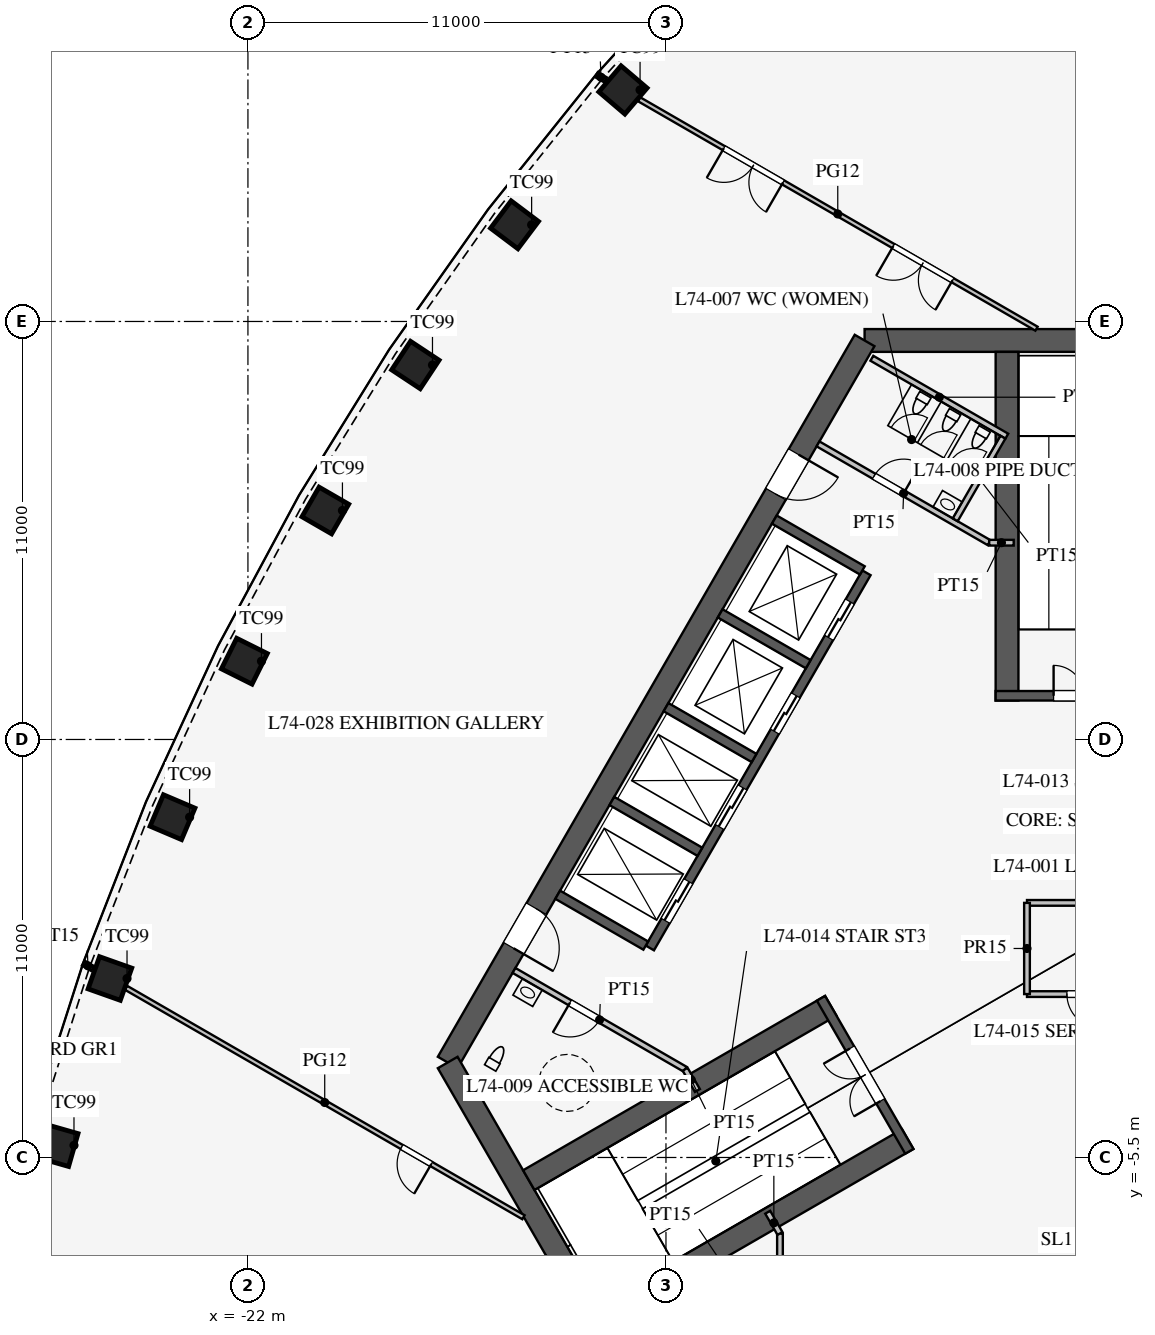
"""IFC4 building model, lengths in metres.
Left out: names, types, materials, properties, quantities, classifications, styles, units other than length and angle.
Written with IfcOpenShell. Run it as: python <this file> out.ifc"""

import sys

from ifc_helpers import new_model, si_unit, direction, frame, frame_2d, origin, origin_2d, place, context, subcontext, project, spatial, rectangle, extrude, element, fill, save


model = new_model("IFC4")
c1 = context("Model", 3, precision=1e-05, world=origin(), true_north=direction((0.0, 1.0)))
c2 = subcontext(c1, "Body", "Model", "MODEL_VIEW")
j1 = project(units=[si_unit("LENGTHUNIT", "METRE"), si_unit("PLANEANGLEUNIT", "RADIAN")], contexts=[c1])
p1 = place(None, origin())
s1 = spatial("IfcSite", under=j1, at=p1, CompositionType="ELEMENT")
p2 = place(p1, origin())
s2 = spatial("IfcBuilding", under=s1, at=p2, CompositionType="ELEMENT")
p3 = place(p2, frame((0.0, 0.0, 322.5)))
s3 = spatial("IfcBuildingStorey", under=s2, at=p3, CompositionType="ELEMENT", Elevation=322.5)
for number, where, z_axis, x_axis in (
    (1, (-12.132, 22.593, 0.0), (0.0, 0.0, 1.0), (-0.649, -0.761, 0.0)),
    (2, (-14.985, 19.044, 0.0), (0.0, 0.0, 1.0), (-0.601, -0.799, 0.0)),
    (3, (-17.594, 15.354, 0.0), (0.0, 0.0, 1.0), (-0.552, -0.834, 0.0)),
    (4, (-19.963, 11.526, 0.0), (0.0, 0.0, 1.0), (-0.5, -0.866, 0.0)),
    (5, (-22.094, 7.56, 0.0), (0.0, 0.0, 1.0), (-0.447, -0.895, 0.0)),
    (6, (-23.985, 3.455, 0.0), (0.0, 0.0, 1.0), (-0.391, -0.92, 0.0)),
    (7, (-25.632, -0.79, 0.0), (0.0, 0.0, 1.0), (-0.334, -0.942, 0.0)),
    (8, (-27.027, -5.18, 0.0), (0.0, 0.0, 1.0), (-0.275, -0.961, 0.0)),
):
    element("IfcColumn", number, at=place(p3, frame(where, z_axis=z_axis, x_axis=x_axis)), inside=s3, PredefinedType="COLUMN", context=c2, shape_type="SweptSolid", body=[
        extrude(rectangle(XDim=0.9, YDim=0.9, at=origin_2d()), origin(), (0.0, 0.0, 1.0), 6.0),
    ])
p4 = place(p3, frame((5.773, 16.0, 0.0), z_axis=(0.0, 0.0, 1.0), x_axis=(-1.0, 0.0, 0.0)))
e9 = element("IfcWall", 9, at=p4, inside=s3, PredefinedType="SHEAR", context=c2, shape_type="SweptSolid", body=[
    extrude(rectangle(XDim=11.547, YDim=0.6, at=frame_2d((5.773, 0.0))), origin(), (0.0, 0.0, 1.0), 6.0),
])
p5 = place(p3, frame((-5.773, 16.0, 0.0), z_axis=(0.0, 0.0, 1.0), x_axis=(-0.500002442456, -0.866023993627, 0.0)))
e10 = element("IfcWall", 10, at=p5, inside=s3, PredefinedType="SHEAR", context=c2, shape_type="SweptSolid", body=[
    extrude(rectangle(XDim=21.939, YDim=0.6, at=frame_2d((10.97, 0.0))), origin(), (0.0, 0.0, 1.0), 6.0),
])
p6 = place(p5, frame((17.27, 0.0, 0.0)))
e11 = element("IfcOpeningElement", 11, at=p6, cuts=e10, PredefinedType="OPENING", context=c2, shape_type="SweptSolid", body=[
    extrude(rectangle(XDim=1.2, YDim=2.1, at=frame_2d((0.6, 1.05))), frame((0.0, 0.31, 0.0), z_axis=(0.0, -1.0, 0.0), x_axis=(1.0, 0.0, 0.0)), (0.0, 0.0, 1.0), 0.62),
])
p7 = place(p5, frame((3.47, 0.0, 0.0)))
e12 = element("IfcOpeningElement", 12, at=p7, cuts=e10, PredefinedType="OPENING", context=c2, shape_type="SweptSolid", body=[
    extrude(rectangle(XDim=1.2, YDim=2.1, at=frame_2d((0.6, 1.05))), frame((0.0, 0.31, 0.0), z_axis=(0.0, -1.0, 0.0), x_axis=(1.0, 0.0, 0.0)), (0.0, 0.0, 1.0), 0.62),
])
p8 = place(p3, frame((-16.743, -3.0, 0.0), z_axis=(0.0, 0.0, 1.0), x_axis=(0.499995765644, -0.866027848477, 0.0)))
e13 = element("IfcWall", 13, at=p8, inside=s3, PredefinedType="SHEAR", context=c2, shape_type="SweptSolid", body=[
    extrude(rectangle(XDim=11.547, YDim=0.6, at=frame_2d((5.773, 0.0))), origin(), (0.0, 0.0, 1.0), 6.0),
])
p9 = place(p3, frame((-5.724, 9.886, 0.0), z_axis=(0.0, 0.0, 1.0), x_axis=(-0.500001763848, -0.866024385424, 0.0)))
e14 = element("IfcWall", 14, at=p9, inside=s3, PredefinedType="SHEAR", context=c2, shape_type="SweptSolid", body=[
    extrude(rectangle(XDim=11.4, YDim=0.25, at=frame_2d((5.7, 0.0))), origin(), (0.0, 0.0, 1.0), 6.0),
])
p10 = place(p9, frame((0.875, 0.0, 0.0)))
e15 = element("IfcOpeningElement", 15, at=p10, cuts=e14, PredefinedType="OPENING", context=c2, shape_type="SweptSolid", body=[
    extrude(rectangle(XDim=1.1, YDim=2.2, at=frame_2d((0.55, 1.1))), frame((0.0, 0.135, 0.0), z_axis=(0.0, -1.0, 0.0), x_axis=(1.0, 0.0, 0.0)), (0.0, 0.0, 1.0), 0.27),
])
p11 = place(p9, frame((3.725, 0.0, 0.0)))
e16 = element("IfcOpeningElement", 16, at=p11, cuts=e14, PredefinedType="OPENING", context=c2, shape_type="SweptSolid", body=[
    extrude(rectangle(XDim=1.1, YDim=2.2, at=frame_2d((0.55, 1.1))), frame((0.0, 0.135, 0.0), z_axis=(0.0, -1.0, 0.0), x_axis=(1.0, 0.0, 0.0)), (0.0, 0.0, 1.0), 0.27),
])
p12 = place(p9, frame((6.525, 0.0, 0.0)))
e17 = element("IfcOpeningElement", 17, at=p12, cuts=e14, PredefinedType="OPENING", context=c2, shape_type="SweptSolid", body=[
    extrude(rectangle(XDim=1.2, YDim=2.2, at=frame_2d((0.6, 1.1))), frame((0.0, 0.135, 0.0), z_axis=(0.0, -1.0, 0.0), x_axis=(1.0, 0.0, 0.0)), (0.0, 0.0, 1.0), 0.27),
])
p13 = place(p9, frame((9.375, 0.0, 0.0)))
e18 = element("IfcOpeningElement", 18, at=p13, cuts=e14, PredefinedType="OPENING", context=c2, shape_type="SweptSolid", body=[
    extrude(rectangle(XDim=1.2, YDim=2.2, at=frame_2d((0.6, 1.1))), frame((0.0, 0.135, 0.0), z_axis=(0.0, -1.0, 0.0), x_axis=(1.0, 0.0, 0.0)), (0.0, 0.0, 1.0), 0.27),
])
for number, where, z_axis, x_axis in (
    (19, (-5.832, 9.949, 0.0), (0.0, 0.0, 1.0), (-0.866, 0.5, 0.0)),
    (20, (-7.257, 7.481, 0.0), (0.0, 0.0, 1.0), (-0.866, 0.5, 0.0)),
    (21, (-8.682, 5.012, 0.0), (0.0, 0.0, 1.0), (-0.866, 0.5, 0.0)),
    (22, (-10.107, 2.544, 0.0), (0.0, 0.0, 1.0), (-0.866, 0.5, 0.0)),
    (23, (-11.532, 0.076, 0.0), (0.0, 0.0, 1.0), (-0.866, 0.5, 0.0)),
):
    element("IfcWall", number, at=place(p3, frame(where, z_axis=z_axis, x_axis=x_axis)), inside=s3, PredefinedType="SHEAR", context=c2, shape_type="SweptSolid", body=[
        extrude(rectangle(XDim=2.675, YDim=0.25, at=frame_2d((1.337, 0.0))), origin(), (0.0, 0.0, 1.0), 6.0),
    ])
p14 = place(p3, frame((-2.025, 6.525, 0.0), z_axis=(0.0, 0.0, 1.0), x_axis=(0.0, 1.0, 0.0)))
e24 = element("IfcWall", 24, at=p14, inside=s3, PredefinedType="SHEAR", context=c2, shape_type="SweptSolid", body=[
    extrude(rectangle(XDim=9.175, YDim=0.6, at=frame_2d((4.587, 0.0))), origin(), (0.0, 0.0, 1.0), 6.0),
])
p15 = place(p3, frame((2.325, 6.65, 0.0), z_axis=(0.0, 0.0, 1.0), x_axis=(-1.0, 0.0, 0.0)))
e25 = element("IfcWall", 25, at=p15, inside=s3, PredefinedType="SHEAR", context=c2, shape_type="SweptSolid", body=[
    extrude(rectangle(XDim=4.65, YDim=0.25, at=frame_2d((2.325, 0.0))), origin(), (0.0, 0.0, 1.0), 6.0),
])
p16 = place(p15, frame((1.525, 0.0, 0.0)))
e26 = element("IfcOpeningElement", 26, at=p16, cuts=e25, PredefinedType="OPENING", context=c2, shape_type="SweptSolid", body=[
    extrude(rectangle(XDim=1.6, YDim=2.1, at=frame_2d((0.8, 1.05))), frame((0.0, 0.135, 0.0), z_axis=(0.0, -1.0, 0.0), x_axis=(1.0, 0.0, 0.0)), (0.0, 0.0, 1.0), 0.27),
])
p17 = place(p3, frame((-6.663, -1.509, 0.0), z_axis=(0.0, 0.0, 1.0), x_axis=(-0.86603049496, -0.499991181721, 0.0)))
e27 = element("IfcWall", 27, at=p17, inside=s3, PredefinedType="SHEAR", context=c2, shape_type="SweptSolid", body=[
    extrude(rectangle(XDim=9.175, YDim=0.6, at=frame_2d((4.587, 0.0))), origin(), (0.0, 0.0, 1.0), 6.0),
])
p18 = place(p3, frame((-4.638, -5.016, 0.0), z_axis=(0.0, 0.0, 1.0), x_axis=(-0.866012320003, -0.50002266109, 0.0)))
e28 = element("IfcWall", 28, at=p18, inside=s3, PredefinedType="SHEAR", context=c2, shape_type="SweptSolid", body=[
    extrude(rectangle(XDim=9.175, YDim=0.6, at=frame_2d((4.587, 0.0))), origin(), (0.0, 0.0, 1.0), 6.0),
])
p19 = place(p3, frame((-6.922, -1.312, 0.0), z_axis=(0.0, 0.0, 1.0), x_axis=(0.499984536904, -0.866034331223, 0.0)))
e29 = element("IfcWall", 29, at=p19, inside=s3, PredefinedType="SHEAR", context=c2, shape_type="SweptSolid", body=[
    extrude(rectangle(XDim=4.65, YDim=0.25, at=frame_2d((2.325, 0.0))), origin(), (0.0, 0.0, 1.0), 6.0),
])
p20 = place(p19, frame((1.525, 0.0, 0.0)))
e30 = element("IfcOpeningElement", 30, at=p20, cuts=e29, PredefinedType="OPENING", context=c2, shape_type="SweptSolid", body=[
    extrude(rectangle(XDim=1.6, YDim=2.1, at=frame_2d((0.8, 1.05))), frame((0.0, 0.135, 0.0), z_axis=(0.0, -1.0, 0.0), x_axis=(1.0, 0.0, 0.0)), (0.0, 0.0, 1.0), 0.27),
])
p21 = place(p3, frame((-8.0, -7.5, 0.0), z_axis=(0.0, 0.0, 1.0), x_axis=(0.0, -1.0, 0.0)))
e31 = element("IfcWall", 31, at=p21, inside=s3, PredefinedType="PARTITIONING", context=c2, shape_type="SweptSolid", body=[
    extrude(rectangle(XDim=5.2, YDim=0.15, at=frame_2d((2.6, 0.0))), origin(), (0.0, 0.0, 1.0), 5.75),
])
p22 = place(p21, frame((2.6, 0.0, 0.0)))
e32 = element("IfcOpeningElement", 32, at=p22, cuts=e31, PredefinedType="OPENING", context=c2, shape_type="SweptSolid", body=[
    extrude(rectangle(XDim=0.9, YDim=2.1, at=frame_2d((0.45, 1.05))), frame((0.0, 0.085, 0.0), z_axis=(0.0, -1.0, 0.0), x_axis=(1.0, 0.0, 0.0)), (0.0, 0.0, 1.0), 0.17),
])
p23 = place(p3, frame((-10.495, -3.178, 0.0), z_axis=(0.0, 0.0, 1.0), x_axis=(-0.866021400173, 0.500006934395, 0.0)))
e33 = element("IfcWall", 33, at=p23, inside=s3, PredefinedType="PARTITIONING", context=c2, shape_type="SweptSolid", body=[
    extrude(rectangle(XDim=5.2, YDim=0.15, at=frame_2d((2.6, 0.0))), origin(), (0.0, 0.0, 1.0), 5.75),
])
p24 = place(p23, frame((2.6, 0.0, 0.0)))
e34 = element("IfcOpeningElement", 34, at=p24, cuts=e33, PredefinedType="OPENING", context=c2, shape_type="SweptSolid", body=[
    extrude(rectangle(XDim=0.9, YDim=2.1, at=frame_2d((0.45, 1.05))), frame((0.0, 0.085, 0.0), z_axis=(0.0, -1.0, 0.0), x_axis=(1.0, 0.0, 0.0)), (0.0, 0.0, 1.0), 0.17),
])
p25 = place(p3, frame((-2.495, 10.678, 0.0), z_axis=(0.0, 0.0, 1.0), x_axis=(-0.866021400173, 0.500006934395, 0.0)))
e35 = element("IfcWall", 35, at=p25, inside=s3, PredefinedType="PARTITIONING", context=c2, shape_type="SweptSolid", body=[
    extrude(rectangle(XDim=5.2, YDim=0.15, at=frame_2d((2.6, 0.0))), origin(), (0.0, 0.0, 1.0), 5.75),
])
p26 = place(p25, frame((2.6, 0.0, 0.0)))
e36 = element("IfcOpeningElement", 36, at=p26, cuts=e35, PredefinedType="OPENING", context=c2, shape_type="SweptSolid", body=[
    extrude(rectangle(XDim=0.9, YDim=2.1, at=frame_2d((0.45, 1.05))), frame((0.0, 0.085, 0.0), z_axis=(0.0, -1.0, 0.0), x_axis=(1.0, 0.0, 0.0)), (0.0, 0.0, 1.0), 0.17),
])
p27 = place(p3, frame((-2.495, 10.678, 0.0), z_axis=(0.0, 0.0, 1.0), x_axis=(1.0, 0.0, 0.0)))
e37 = element("IfcWall", 37, at=p27, inside=s3, PredefinedType="PARTITIONING", context=c2, shape_type="SweptSolid", body=[
    extrude(rectangle(XDim=0.645, YDim=0.15, at=frame_2d((0.323, 0.0))), origin(), (0.0, 0.0, 1.0), 5.75),
])
for number, where, z_axis, x_axis in (
    (38, (-10.495, -3.178, 0.0), (0.0, 0.0, 1.0), (0.5, -0.866, 0.0)),
    (39, (-8.0, -7.5, 0.0), (0.0, 0.0, 1.0), (-0.5, 0.866, 0.0)),
):
    element("IfcWall", number, at=place(p3, frame(where, z_axis=z_axis, x_axis=x_axis)), inside=s3, PredefinedType="PARTITIONING", context=c2, shape_type="SweptSolid", body=[
        extrude(rectangle(XDim=0.645, YDim=0.15, at=frame_2d((0.323, 0.0))), origin(), (0.0, 0.0, 1.0), 5.75),
    ])
p28 = place(p3, frame((-2.031, 13.482, 0.0), z_axis=(0.0, 0.0, 1.0), x_axis=(-0.866050731258, 0.499956128963, 0.0)))
e40 = element("IfcWall", 40, at=p28, inside=s3, PredefinedType="PARTITIONING", context=c2, shape_type="SweptSolid", body=[
    extrude(rectangle(XDim=4.1, YDim=0.15, at=frame_2d((2.05, 0.0))), origin(), (0.0, 0.0, 1.0), 5.75),
])
p29 = place(p3, frame((-3.389, 11.281, 0.0), z_axis=(0.0, 0.0, 1.0), x_axis=(0.499989096993, 0.866031698547, 0.0)))
e41 = element("IfcWall", 41, at=p29, inside=s3, PredefinedType="PARTITIONING", context=c2, shape_type="SweptSolid", body=[
    extrude(rectangle(XDim=2.51, YDim=0.15, at=frame_2d((1.255, 0.0))), origin(), (0.0, 0.0, 1.0), 5.75),
])
p30 = place(p3, frame((-1.5, -1.2, 0.0), z_axis=(0.0, 0.0, 1.0), x_axis=(1.0, 0.0, 0.0)))
e42 = element("IfcWall", 42, at=p30, inside=s3, PredefinedType="PARTITIONING", context=c2, shape_type="SweptSolid", body=[
    extrude(rectangle(XDim=3.0, YDim=0.15, at=frame_2d((1.5, 0.0))), origin(), (0.0, 0.0, 1.0), 5.75),
])
p31 = place(p30, frame((1.05, 0.0, 0.0)))
e43 = element("IfcOpeningElement", 43, at=p31, cuts=e42, PredefinedType="OPENING", context=c2, shape_type="SweptSolid", body=[
    extrude(rectangle(XDim=0.9, YDim=2.1, at=frame_2d((0.45, 1.05))), frame((0.0, 0.085, 0.0), z_axis=(0.0, -1.0, 0.0), x_axis=(1.0, 0.0, 0.0)), (0.0, 0.0, 1.0), 0.17),
])
p32 = place(p3, frame((1.5, 1.2, 0.0), z_axis=(0.0, 0.0, 1.0), x_axis=(-1.0, 0.0, 0.0)))
e44 = element("IfcWall", 44, at=p32, inside=s3, PredefinedType="PARTITIONING", context=c2, shape_type="SweptSolid", body=[
    extrude(rectangle(XDim=3.0, YDim=0.15, at=frame_2d((1.5, 0.0))), origin(), (0.0, 0.0, 1.0), 5.75),
])
p33 = place(p3, frame((-1.5, 1.2, 0.0), z_axis=(0.0, 0.0, 1.0), x_axis=(0.0, -1.0, 0.0)))
e45 = element("IfcWall", 45, at=p33, inside=s3, PredefinedType="PARTITIONING", context=c2, shape_type="SweptSolid", body=[
    extrude(rectangle(XDim=2.4, YDim=0.15, at=frame_2d((1.2, 0.0))), origin(), (0.0, 0.0, 1.0), 5.75),
])
for number, where, z_axis, x_axis in (
    (46, (-26.089, -0.526, 0.0), (0.0, 0.0, 1.0), (-0.866, 0.5, 0.0)),
    (47, (-12.589, 22.857, 0.0), (0.0, 0.0, 1.0), (-0.866, 0.5, 0.0)),
):
    element("IfcWall", number, at=place(p3, frame(where, z_axis=z_axis, x_axis=x_axis)), inside=s3, PredefinedType="PARTITIONING", context=c2, shape_type="SweptSolid", body=[
        extrude(rectangle(XDim=0.28, YDim=0.15, at=frame_2d((0.14, 0.0))), origin(), (0.0, 0.0, 1.0), 4.5),
    ])
p34 = place(p3, frame((-14.75, -7.073, 0.0), z_axis=(0.0, 0.0, 1.0), x_axis=(-0.866024005325, 0.500002422196, 0.0)))
e48 = element("IfcWall", 48, at=p34, inside=s3, PredefinedType="PARTITIONING", context=c2, shape_type="SweptSolid", body=[
    extrude(rectangle(XDim=12.078, YDim=0.12, at=frame_2d((6.039, 0.0))), origin(), (0.0, 0.0, 1.0), 4.5),
])
p35 = place(p34, frame((2.8, 0.0, 0.0)))
e49 = element("IfcOpeningElement", 49, at=p35, cuts=e48, PredefinedType="OPENING", context=c2, shape_type="SweptSolid", body=[
    extrude(rectangle(XDim=0.9, YDim=2.1, at=frame_2d((0.45, 1.05))), frame((0.0, 0.07, 0.0), z_axis=(0.0, -1.0, 0.0), x_axis=(1.0, 0.0, 0.0)), (0.0, 0.0, 1.0), 0.14),
])
p36 = place(p3, frame((-1.25, 16.31, 0.0), z_axis=(0.0, 0.0, 1.0), x_axis=(-0.866032758387, 0.499987261238, 0.0)))
e50 = element("IfcWall", 50, at=p36, inside=s3, PredefinedType="PARTITIONING", context=c2, shape_type="SweptSolid", body=[
    extrude(rectangle(XDim=12.077, YDim=0.12, at=frame_2d((6.039, 0.0))), origin(), (0.0, 0.0, 1.0), 4.5),
])
p37 = place(p36, frame((2.55, 0.0, 0.0)))
e51 = element("IfcOpeningElement", 51, at=p37, cuts=e50, PredefinedType="OPENING", context=c2, shape_type="SweptSolid", body=[
    extrude(rectangle(XDim=1.8, YDim=2.1, at=frame_2d((0.9, 1.05))), frame((0.0, 0.07, 0.0), z_axis=(0.0, -1.0, 0.0), x_axis=(1.0, 0.0, 0.0)), (0.0, 0.0, 1.0), 0.14),
])
p38 = place(p36, frame((7.7, 0.0, 0.0)))
e52 = element("IfcOpeningElement", 52, at=p38, cuts=e50, PredefinedType="OPENING", context=c2, shape_type="SweptSolid", body=[
    extrude(rectangle(XDim=1.8, YDim=2.1, at=frame_2d((0.9, 1.05))), frame((0.0, 0.07, 0.0), z_axis=(0.0, -1.0, 0.0), x_axis=(1.0, 0.0, 0.0)), (0.0, 0.0, 1.0), 0.14),
])
p39 = place(p24, origin())
e53 = element("IfcDoor", 53, at=p39, inside=s3, OperationType="SINGLE_SWING_RIGHT", PredefinedType="DOOR", context=c2, shape_type="SweptSolid", body=[
    extrude(rectangle(XDim=0.9, YDim=2.1, at=frame_2d((0.45, 1.05))), frame((0.0, 0.025, 0.0), z_axis=(0.0, -1.0, 0.0), x_axis=(1.0, 0.0, 0.0)), (0.0, 0.0, 1.0), 0.05),
])
fill(e34, e53)
p40 = place(p26, frame((0.9, 0.0, 0.0), z_axis=(0.0, 0.0, 1.0), x_axis=(-1.0, 0.0, 0.0)))
e54 = element("IfcDoor", 54, at=p40, inside=s3, OperationType="SINGLE_SWING_RIGHT", PredefinedType="DOOR", context=c2, shape_type="SweptSolid", body=[
    extrude(rectangle(XDim=0.9, YDim=2.1, at=frame_2d((0.45, 1.05))), frame((0.0, 0.025, 0.0), z_axis=(0.0, -1.0, 0.0), x_axis=(1.0, 0.0, 0.0)), (0.0, 0.0, 1.0), 0.05),
])
fill(e36, e54)
p41 = place(p31, frame((0.9, 0.0, 0.0), z_axis=(0.0, 0.0, 1.0), x_axis=(-1.0, 0.0, 0.0)))
e55 = element("IfcDoor", 55, at=p41, inside=s3, OperationType="SINGLE_SWING_LEFT", PredefinedType="DOOR", context=c2, shape_type="SweptSolid", body=[
    extrude(rectangle(XDim=0.9, YDim=2.1, at=frame_2d((0.45, 1.05))), frame((0.0, 0.025, 0.0), z_axis=(0.0, -1.0, 0.0), x_axis=(1.0, 0.0, 0.0)), (0.0, 0.0, 1.0), 0.05),
])
fill(e43, e55)
p42 = place(p16, frame((1.6, 0.0, 0.0), z_axis=(0.0, 0.0, 1.0), x_axis=(-1.0, 0.0, 0.0)))
e56 = element("IfcDoor", 56, at=p42, inside=s3, OperationType="DOUBLE_DOOR_SINGLE_SWING", PredefinedType="DOOR", context=c2, shape_type="SweptSolid", body=[
    extrude(rectangle(XDim=1.6, YDim=2.1, at=frame_2d((0.8, 1.05))), frame((0.0, 0.025, 0.0), z_axis=(0.0, -1.0, 0.0), x_axis=(1.0, 0.0, 0.0)), (0.0, 0.0, 1.0), 0.05),
])
fill(e26, e56)
p43 = place(p20, frame((1.6, 0.0, 0.0), z_axis=(0.0, 0.0, 1.0), x_axis=(-1.0, 0.0, 0.0)))
e57 = element("IfcDoor", 57, at=p43, inside=s3, OperationType="DOUBLE_DOOR_SINGLE_SWING", PredefinedType="DOOR", context=c2, shape_type="SweptSolid", body=[
    extrude(rectangle(XDim=1.6, YDim=2.1, at=frame_2d((0.8, 1.05))), frame((0.0, 0.025, 0.0), z_axis=(0.0, -1.0, 0.0), x_axis=(1.0, 0.0, 0.0)), (0.0, 0.0, 1.0), 0.05),
])
fill(e30, e57)
p44 = place(p6, origin())
e58 = element("IfcDoor", 58, at=p44, inside=s3, OperationType="SINGLE_SWING_RIGHT", PredefinedType="DOOR", context=c2, shape_type="SweptSolid", body=[
    extrude(rectangle(XDim=1.2, YDim=2.1, at=frame_2d((0.6, 1.05))), frame((0.0, 0.025, 0.0), z_axis=(0.0, -1.0, 0.0), x_axis=(1.0, 0.0, 0.0)), (0.0, 0.0, 1.0), 0.05),
])
fill(e11, e58)
p45 = place(p7, origin())
e59 = element("IfcDoor", 59, at=p45, inside=s3, OperationType="SINGLE_SWING_LEFT", PredefinedType="DOOR", context=c2, shape_type="SweptSolid", body=[
    extrude(rectangle(XDim=1.2, YDim=2.1, at=frame_2d((0.6, 1.05))), frame((0.0, 0.025, 0.0), z_axis=(0.0, -1.0, 0.0), x_axis=(1.0, 0.0, 0.0)), (0.0, 0.0, 1.0), 0.05),
])
fill(e12, e59)
p46 = place(p35, origin())
e60 = element("IfcDoor", 60, at=p46, inside=s3, OperationType="SINGLE_SWING_LEFT", PredefinedType="DOOR", context=c2, shape_type="SweptSolid", body=[
    extrude(rectangle(XDim=0.9, YDim=2.1, at=frame_2d((0.45, 1.05))), frame((0.0, 0.025, 0.0), z_axis=(0.0, -1.0, 0.0), x_axis=(1.0, 0.0, 0.0)), (0.0, 0.0, 1.0), 0.05),
])
fill(e49, e60)
p47 = place(p37, origin())
e61 = element("IfcDoor", 61, at=p47, inside=s3, OperationType="DOUBLE_DOOR_SINGLE_SWING", PredefinedType="DOOR", context=c2, shape_type="SweptSolid", body=[
    extrude(rectangle(XDim=1.8, YDim=2.1, at=frame_2d((0.9, 1.05))), frame((0.0, 0.025, 0.0), z_axis=(0.0, -1.0, 0.0), x_axis=(1.0, 0.0, 0.0)), (0.0, 0.0, 1.0), 0.05),
])
fill(e51, e61)
p48 = place(p38, origin())
e62 = element("IfcDoor", 62, at=p48, inside=s3, OperationType="DOUBLE_DOOR_SINGLE_SWING", PredefinedType="DOOR", context=c2, shape_type="SweptSolid", body=[
    extrude(rectangle(XDim=1.8, YDim=2.1, at=frame_2d((0.9, 1.05))), frame((0.0, 0.025, 0.0), z_axis=(0.0, -1.0, 0.0), x_axis=(1.0, 0.0, 0.0)), (0.0, 0.0, 1.0), 0.05),
])
fill(e52, e62)
p49 = place(p10, origin())
e63 = element("IfcDoor", 63, at=p49, inside=s3, OperationType="DOUBLE_DOOR_SLIDING", PredefinedType="DOOR", context=c2, shape_type="SweptSolid", body=[
    extrude(rectangle(XDim=1.1, YDim=2.2, at=frame_2d((0.55, 1.1))), frame((0.0, 0.025, 0.0), z_axis=(0.0, -1.0, 0.0), x_axis=(1.0, 0.0, 0.0)), (0.0, 0.0, 1.0), 0.05),
])
fill(e15, e63)
p50 = place(p11, origin())
e64 = element("IfcDoor", 64, at=p50, inside=s3, OperationType="DOUBLE_DOOR_SLIDING", PredefinedType="DOOR", context=c2, shape_type="SweptSolid", body=[
    extrude(rectangle(XDim=1.1, YDim=2.2, at=frame_2d((0.55, 1.1))), frame((0.0, 0.025, 0.0), z_axis=(0.0, -1.0, 0.0), x_axis=(1.0, 0.0, 0.0)), (0.0, 0.0, 1.0), 0.05),
])
fill(e16, e64)
p51 = place(p12, origin())
e65 = element("IfcDoor", 65, at=p51, inside=s3, OperationType="DOUBLE_DOOR_SLIDING", PredefinedType="DOOR", context=c2, shape_type="SweptSolid", body=[
    extrude(rectangle(XDim=1.2, YDim=2.2, at=frame_2d((0.6, 1.1))), frame((0.0, 0.025, 0.0), z_axis=(0.0, -1.0, 0.0), x_axis=(1.0, 0.0, 0.0)), (0.0, 0.0, 1.0), 0.05),
])
fill(e17, e65)
p52 = place(p13, origin())
e66 = element("IfcDoor", 66, at=p52, inside=s3, OperationType="DOUBLE_DOOR_SLIDING", PredefinedType="DOOR", context=c2, shape_type="SweptSolid", body=[
    extrude(rectangle(XDim=1.2, YDim=2.2, at=frame_2d((0.6, 1.1))), frame((0.0, 0.025, 0.0), z_axis=(0.0, -1.0, 0.0), x_axis=(1.0, 0.0, 0.0)), (0.0, 0.0, 1.0), 0.05),
])
fill(e18, e66)
save(model, sys.argv[1])
